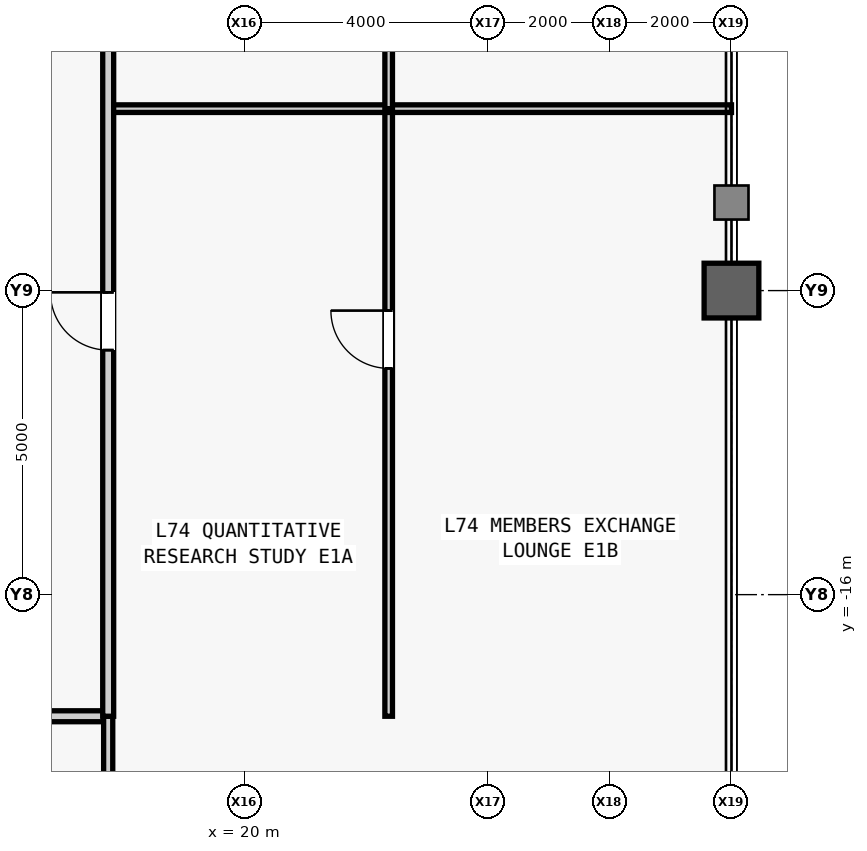
"""IFC4 building model, lengths in metres.
Left out: names, types, materials, properties, quantities, classifications, styles, units other than length and angle.
Written with IfcOpenShell. Run it as: python <this file> out.ifc"""

import sys

from ifc_helpers import new_model, si_unit, direction, frame, frame_2d, origin, origin_2d, place, context, subcontext, project, spatial, rectangle, hollow_rectangle, extrude, source, transform, mapped, element, fill, save


model = new_model("IFC4")
c1 = context("Model", 3, precision=1e-05, world=origin(), true_north=direction((0.0, 1.0)))
c2 = subcontext(c1, "Body", "Model", "MODEL_VIEW")
j1 = project(units=[si_unit("LENGTHUNIT", "METRE"), si_unit("PLANEANGLEUNIT", "RADIAN")], contexts=[c1])
p1 = place(None, origin())
s1 = spatial("IfcSite", under=j1, at=p1, CompositionType="ELEMENT")
p2 = place(p1, origin())
s2 = spatial("IfcBuilding", under=s1, at=p2, CompositionType="ELEMENT")
p3 = place(p2, frame((0.0, 0.0, 313.5)))
s3 = spatial("IfcBuildingStorey", under=s2, at=p3, CompositionType="ELEMENT", Elevation=313.5)
m1 = source(origin(), c2, "Body", "SweptSolid", [
    extrude(hollow_rectangle(XDim=0.9, YDim=0.9, WallThickness=0.05, at=origin_2d()), origin(), (0.0, 0.0, 1.0), 4.0),
])
p4 = place(p3, frame((28.0, -11.0, 0.0), z_axis=(0.0, 0.0, 1.0), x_axis=(1.0, 0.0, 0.0)))
e1 = element("IfcColumn", 1, at=p4, inside=s3, PredefinedType="COLUMN", context=c2, shape_type="MappedRepresentation", body=[
    mapped(m1, transform((0.0, 0.0, 0.0), scale=1.0)),
])
m2 = source(origin(), c2, "Body", "SweptSolid", [
    extrude(rectangle(XDim=37.55, YDim=0.18, at=frame_2d((18.775, 0.0))), origin(), (0.0, 0.0, 1.0), 3.78),
])
p5 = place(p3, frame((-19.8, -18.0, 0.0), z_axis=(0.0, 0.0, 1.0), x_axis=(1.0, 0.0, 0.0)))
e2 = element("IfcWall", 2, at=p5, inside=s3, PredefinedType="PARTITIONING", context=c2, shape_type="MappedRepresentation", body=[
    mapped(m2, transform((0.0, 0.0, 0.0), scale=1.0)),
])
m3 = source(origin(), c2, "Body", "SweptSolid", [
    extrude(rectangle(XDim=1.05, YDim=2.2, at=frame_2d((0.525, 1.1))), frame((0.0, 0.1, 0.0), z_axis=(0.0, -1.0, 0.0), x_axis=(1.0, 0.0, 0.0)), (0.0, 0.0, 1.0), 0.2),
])
p6 = place(p5, frame((5.983, 0.0, 0.0)))
e3 = element("IfcOpeningElement", 3, at=p6, cuts=e2, PredefinedType="OPENING", context=c2, shape_type="MappedRepresentation", body=[
    mapped(m3, transform((0.0, 0.0, 0.0), scale=1.0)),
])
p7 = place(p5, frame((17.875, 0.0, 0.0)))
e4 = element("IfcOpeningElement", 4, at=p7, cuts=e2, PredefinedType="OPENING", context=c2, shape_type="MappedRepresentation", body=[
    mapped(m3, transform((0.0, 0.0, 0.0), scale=1.0)),
])
p8 = place(p5, frame((30.116, 0.0, 0.0)))
e5 = element("IfcOpeningElement", 5, at=p8, cuts=e2, PredefinedType="OPENING", context=c2, shape_type="MappedRepresentation", body=[
    mapped(m3, transform((0.0, 0.0, 0.0), scale=1.0)),
])
m4 = source(origin(), c2, "Body", "SweptSolid", [
    extrude(rectangle(XDim=10.0, YDim=0.15, at=frame_2d((5.0, 0.0))), origin(), (0.0, 0.0, 1.0), 3.78),
])
p9 = place(p3, frame((17.75, -28.0, 0.0), z_axis=(0.0, 0.0, 1.0), x_axis=(0.0, 1.0, 0.0)))
e6 = element("IfcWall", 6, at=p9, inside=s3, PredefinedType="PARTITIONING", context=c2, shape_type="MappedRepresentation", body=[
    mapped(m4, transform((0.0, 0.0, 0.0), scale=1.0)),
])
m5 = source(origin(), c2, "Body", "SweptSolid", [
    extrude(rectangle(XDim=9.992, YDim=0.125, at=frame_2d((4.996, 0.0))), origin(), (0.0, 0.0, 1.0), 3.164),
])
p10 = place(p3, frame((22.363, -18.0, 0.0), z_axis=(0.0, 0.0, 1.0), x_axis=(0.0, 1.0, 0.0)))
e7 = element("IfcWall", 7, at=p10, inside=s3, PredefinedType="PARTITIONING", context=c2, shape_type="MappedRepresentation", body=[
    mapped(m5, transform((0.0, 0.0, 0.0), scale=1.0)),
])
m6 = source(origin(), c2, "Body", "SweptSolid", [
    extrude(rectangle(XDim=0.95, YDim=2.15, at=frame_2d((0.475, 1.075))), frame((0.0, 0.073, 0.0), z_axis=(0.0, -1.0, 0.0), x_axis=(1.0, 0.0, 0.0)), (0.0, 0.0, 1.0), 0.145),
])
p11 = place(p10, frame((5.721, 0.0, 0.0)))
e8 = element("IfcOpeningElement", 8, at=p11, cuts=e7, PredefinedType="OPENING", context=c2, shape_type="MappedRepresentation", body=[
    mapped(m6, transform((0.0, 0.0, 0.0), scale=1.0)),
])
m7 = source(origin(), c2, "Body", "SweptSolid", [
    extrude(rectangle(XDim=10.25, YDim=0.125, at=frame_2d((5.125, 0.0))), origin(), (0.0, 0.0, 1.0), 3.78),
])
p12 = place(p3, frame((17.75, -8.008, 0.0), z_axis=(0.0, 0.0, 1.0), x_axis=(1.0, 0.0, 0.0)))
e9 = element("IfcWall", 9, at=p12, inside=s3, PredefinedType="PARTITIONING", context=c2, shape_type="MappedRepresentation", body=[
    mapped(m7, transform((0.0, 0.0, 0.0), scale=1.0)),
])
m8 = source(origin(), c2, "Body", "SweptSolid", [
    extrude(rectangle(XDim=9.928, YDim=0.125, at=frame_2d((4.964, 0.0))), origin(), (0.0, 0.0, 1.0), 3.78),
])
p13 = place(p3, frame((22.363, -8.008, 0.0), z_axis=(0.0, 0.0, 1.0), x_axis=(0.0, 1.0, 0.0)))
e10 = element("IfcWall", 10, at=p13, inside=s3, PredefinedType="PARTITIONING", context=c2, shape_type="MappedRepresentation", body=[
    mapped(m8, transform((0.0, 0.0, 0.0), scale=1.0)),
])
p14 = place(p13, frame((4.489, 0.0, 0.0)))
e11 = element("IfcOpeningElement", 11, at=p14, cuts=e10, PredefinedType="OPENING", context=c2, shape_type="MappedRepresentation", body=[
    mapped(m6, transform((0.0, 0.0, 0.0), scale=1.0)),
])
m9 = source(origin(), c2, "Body", "SweptSolid", [
    extrude(rectangle(XDim=40.5, YDim=0.18, at=frame_2d((20.25, 0.0))), origin(), (0.0, 0.0, 1.0), 3.78),
])
p15 = place(p3, frame((17.75, -18.0, 0.0), z_axis=(0.0, 0.0, 1.0), x_axis=(0.0, 1.0, 0.0)))
e12 = element("IfcWall", 12, at=p15, inside=s3, PredefinedType="PARTITIONING", context=c2, shape_type="MappedRepresentation", body=[
    mapped(m9, transform((0.0, 0.0, 0.0), scale=1.0)),
])
m10 = source(origin(), c2, "Body", "SweptSolid", [
    extrude(rectangle(XDim=0.95, YDim=2.15, at=frame_2d((0.475, 1.075))), frame((0.0, 0.1, 0.0), z_axis=(0.0, -1.0, 0.0), x_axis=(1.0, 0.0, 0.0)), (0.0, 0.0, 1.0), 0.2),
])
p16 = place(p15, frame((6.021, 0.0, 0.0)))
e13 = element("IfcOpeningElement", 13, at=p16, cuts=e12, PredefinedType="OPENING", context=c2, shape_type="MappedRepresentation", body=[
    mapped(m10, transform((0.0, 0.0, 0.0), scale=1.0)),
])
p17 = place(p15, frame((14.481, 0.0, 0.0)))
e14 = element("IfcOpeningElement", 14, at=p17, cuts=e12, PredefinedType="OPENING", context=c2, shape_type="MappedRepresentation", body=[
    mapped(m10, transform((0.0, 0.0, 0.0), scale=1.0)),
])
p18 = place(p15, frame((24.985, 0.0, 0.0)))
e15 = element("IfcOpeningElement", 15, at=p18, cuts=e12, PredefinedType="OPENING", context=c2, shape_type="MappedRepresentation", body=[
    mapped(m10, transform((0.0, 0.0, 0.0), scale=1.0)),
])
m11 = source(origin(), c2, "Body", "SweptSolid", [
    extrude(rectangle(XDim=0.95, YDim=2.15, at=frame_2d((0.475, 1.075))), frame((0.0, 0.025, 0.0), z_axis=(0.0, -1.0, 0.0), x_axis=(1.0, 0.0, 0.0)), (0.0, 0.0, 1.0), 0.05),
])
p19 = place(p11, origin())
e16 = element("IfcDoor", 16, at=p19, inside=s3, OperationType="SINGLE_SWING_RIGHT", PredefinedType="DOOR", context=c2, shape_type="MappedRepresentation", body=[
    mapped(m11, transform((0.0, 0.0, 0.0), scale=1.0)),
])
fill(e8, e16)
p20 = place(p16, origin())
e17 = element("IfcDoor", 17, at=p20, inside=s3, OperationType="SINGLE_SWING_RIGHT", PredefinedType="DOOR", context=c2, shape_type="MappedRepresentation", body=[
    mapped(m11, transform((0.0, 0.0, 0.0), scale=1.0)),
])
fill(e13, e17)
save(model, sys.argv[1])
